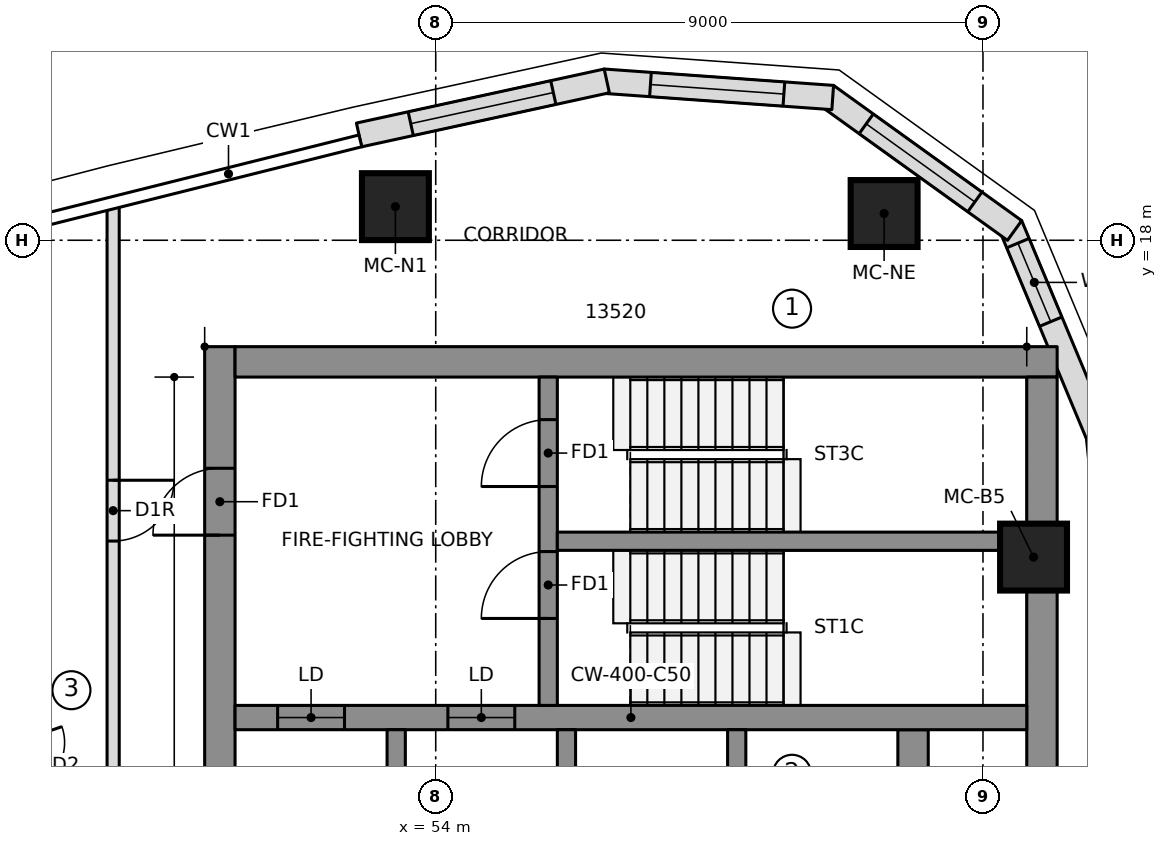
"""IFC4 building model, lengths in metres.
Left out: names, types, materials, properties, quantities, classifications, styles, units other than length and angle.
Written with IfcOpenShell. Run it as: python <this file> out.ifc"""

import sys

from ifc_helpers import new_model, si_unit, direction, frame, frame_2d, origin, origin_2d, place, context, subcontext, project, spatial, polyline, rectangle, outline, extrude, element, fill, save


model = new_model("IFC4")
c1 = context("Model", 3, precision=1e-05, world=origin(), true_north=direction((0.0, 1.0)))
c2 = subcontext(c1, "Body", "Model", "MODEL_VIEW")
j1 = project(units=[si_unit("LENGTHUNIT", "METRE"), si_unit("PLANEANGLEUNIT", "RADIAN")], contexts=[c1])
p1 = place(None, origin())
s1 = spatial("IfcSite", under=j1, at=p1, CompositionType="ELEMENT")
p2 = place(p1, origin())
s2 = spatial("IfcBuilding", under=s1, at=p2, CompositionType="ELEMENT")
p3 = place(p2, frame((0.0, 0.0, 292.75)))
s3 = spatial("IfcBuildingStorey", under=s2, at=p3, CompositionType="ELEMENT", Elevation=292.75)
p4 = place(p3, frame((50.45, 6.65, 0.0), z_axis=(0.0, 0.0, 1.0), x_axis=(0.0, 1.0, 0.0)))
e1 = element("IfcWall", 1, at=p4, inside=s3, PredefinedType="SHEAR", context=c2, shape_type="SweptSolid", body=[
    extrude(rectangle(XDim=9.6, YDim=0.5, at=frame_2d((4.8, 0.0))), origin(), (0.0, 0.0, 1.0), 3.55),
])
p5 = place(p4, frame((6.5, 0.0, 0.0)))
e2 = element("IfcOpeningElement", 2, at=p5, cuts=e1, PredefinedType="OPENING", context=c2, shape_type="SweptSolid", body=[
    extrude(rectangle(XDim=1.1, YDim=2.1, at=frame_2d((0.55, 1.05))), frame((0.0, 0.26, 0.0), z_axis=(0.0, -1.0, 0.0), x_axis=(1.0, 0.0, 0.0)), (0.0, 0.0, 1.0), 0.52),
])
p6 = place(p3, frame((50.7, 16.0, 0.0), z_axis=(0.0, 0.0, 1.0), x_axis=(1.0, 0.0, 0.0)))
e3 = element("IfcWall", 3, at=p6, inside=s3, PredefinedType="SHEAR", context=c2, shape_type="SweptSolid", body=[
    extrude(rectangle(XDim=13.52, YDim=0.5, at=frame_2d((6.76, 0.0))), origin(), (0.0, 0.0, 1.0), 3.55),
])
p7 = place(p3, frame((63.97, 6.903, 0.0), z_axis=(0.0, 0.0, 1.0), x_axis=(0.0, 1.0, 0.0)))
e4 = element("IfcWall", 4, at=p7, inside=s3, PredefinedType="SHEAR", context=c2, shape_type="SweptSolid", body=[
    extrude(rectangle(XDim=8.847, YDim=0.5, at=frame_2d((4.423, 0.0))), origin(), (0.0, 0.0, 1.0), 3.55),
])
p8 = place(p3, frame((61.85, -9.95, 0.0), z_axis=(0.0, 0.0, 1.0), x_axis=(0.0, 1.0, 0.0)))
e5 = element("IfcWall", 5, at=p8, inside=s3, PredefinedType="SHEAR", context=c2, shape_type="SweptSolid", body=[
    extrude(rectangle(XDim=19.9, YDim=0.5, at=frame_2d((9.95, 0.0))), origin(), (0.0, 0.0, 1.0), 3.55),
])
p9 = place(p3, frame((50.7, 10.15, 0.0), z_axis=(0.0, 0.0, 1.0), x_axis=(1.0, 0.0, 0.0)))
e6 = element("IfcWall", 6, at=p9, inside=s3, PredefinedType="SHEAR", context=c2, shape_type="SweptSolid", body=[
    extrude(rectangle(XDim=13.02, YDim=0.4, at=frame_2d((6.51, 0.0))), origin(), (0.0, 0.0, 1.0), 3.55),
])
p10 = place(p9, frame((0.7, 0.0, 0.0)))
e7 = element("IfcOpeningElement", 7, at=p10, cuts=e6, PredefinedType="OPENING", context=c2, shape_type="SweptSolid", body=[
    extrude(rectangle(XDim=1.1, YDim=2.1, at=frame_2d((0.55, 1.05))), frame((0.0, 0.21, 0.0), z_axis=(0.0, -1.0, 0.0), x_axis=(1.0, 0.0, 0.0)), (0.0, 0.0, 1.0), 0.42),
])
p11 = place(p9, frame((3.5, 0.0, 0.0)))
e8 = element("IfcOpeningElement", 8, at=p11, cuts=e6, PredefinedType="OPENING", context=c2, shape_type="SweptSolid", body=[
    extrude(rectangle(XDim=1.1, YDim=2.1, at=frame_2d((0.55, 1.05))), frame((0.0, 0.21, 0.0), z_axis=(0.0, -1.0, 0.0), x_axis=(1.0, 0.0, 0.0)), (0.0, 0.0, 1.0), 0.42),
])
for number, where, z_axis, x_axis in (
    (9, (53.35, 6.95, 0.0), (0.0, 0.0, 1.0), (0.0, 1.0, 0.0)),
    (10, (56.15, 6.95, 0.0), (0.0, 0.0, 1.0), (0.0, 1.0, 0.0)),
    (11, (58.95, 6.95, 0.0), (0.0, 0.0, 1.0), (0.0, 1.0, 0.0)),
):
    element("IfcWall", number, at=place(p3, frame(where, z_axis=z_axis, x_axis=x_axis)), inside=s3, PredefinedType="SHEAR", context=c2, shape_type="SweptSolid", body=[
        extrude(rectangle(XDim=3.0, YDim=0.3, at=frame_2d((1.5, 0.0))), origin(), (0.0, 0.0, 1.0), 3.55),
    ])
p12 = place(p3, frame((55.85, 10.35, 0.0), z_axis=(0.0, 0.0, 1.0), x_axis=(0.0, 1.0, 0.0)))
e12 = element("IfcWall", 12, at=p12, inside=s3, PredefinedType="SHEAR", context=c2, shape_type="SweptSolid", body=[
    extrude(rectangle(XDim=5.4, YDim=0.3, at=frame_2d((2.7, 0.0))), origin(), (0.0, 0.0, 1.0), 3.55),
])
p13 = place(p12, frame((1.43, 0.0, 0.0)))
e13 = element("IfcOpeningElement", 13, at=p13, cuts=e12, PredefinedType="OPENING", context=c2, shape_type="SweptSolid", body=[
    extrude(rectangle(XDim=1.1, YDim=2.1, at=frame_2d((0.55, 1.05))), frame((0.0, 0.16, 0.0), z_axis=(0.0, -1.0, 0.0), x_axis=(1.0, 0.0, 0.0)), (0.0, 0.0, 1.0), 0.32),
])
p14 = place(p12, frame((3.6, 0.0, 0.0)))
e14 = element("IfcOpeningElement", 14, at=p14, cuts=e12, PredefinedType="OPENING", context=c2, shape_type="SweptSolid", body=[
    extrude(rectangle(XDim=1.1, YDim=2.1, at=frame_2d((0.55, 1.05))), frame((0.0, 0.16, 0.0), z_axis=(0.0, -1.0, 0.0), x_axis=(1.0, 0.0, 0.0)), (0.0, 0.0, 1.0), 0.32),
])
p15 = place(p3, frame((56.0, 13.05, 0.0), z_axis=(0.0, 0.0, 1.0), x_axis=(1.0, 0.0, 0.0)))
e15 = element("IfcWall", 15, at=p15, inside=s3, PredefinedType="SHEAR", context=c2, shape_type="SweptSolid", body=[
    extrude(rectangle(XDim=7.72, YDim=0.3, at=frame_2d((3.86, 0.0))), origin(), (0.0, 0.0, 1.0), 3.55),
])
for number, where, z_axis, x_axis in (
    (16, (63.832, 12.789, 0.0), (0.0, 0.0, 1.0), (1.0, 0.0, 0.0)),
    (17, (61.374, 18.44, 0.0), (0.0, 0.0, 1.0), (1.0, 0.0, 0.0)),
    (18, (53.337, 18.553, 0.0), (0.0, 0.0, 1.0), (1.0, 0.0, 0.0)),
):
    element("IfcColumn", number, at=place(p3, frame(where, z_axis=z_axis, x_axis=x_axis)), inside=s3, PredefinedType="COLUMN", context=c2, shape_type="SweptSolid", body=[
        extrude(rectangle(XDim=1.1, YDim=1.1, at=origin_2d()), origin(), (0.0, 0.0, 1.0), 3.55),
    ])
p16 = place(p3, frame((65.331, 10.571, 0.0), z_axis=(0.0, 0.0, 1.0), x_axis=(-0.102249826987, 0.994758751096, 0.0)))
e19 = element("IfcWall", 19, at=p16, inside=s3, PredefinedType="NOTDEFINED", context=c2, shape_type="SweptSolid", body=[
    extrude(outline(polyline([(-0.003, -0.2), (4.263, -0.2), (4.204, 0.2), (0.003, 0.2), (-0.003, -0.2)])), origin(), (0.0, 0.0, 1.0), 3.25),
])
p17 = place(p16, frame((0.417, 0.0, 0.5)))
e20 = element("IfcOpeningElement", 20, at=p17, cuts=e19, PredefinedType="OPENING", context=c2, shape_type="SweptSolid", body=[
    extrude(rectangle(XDim=2.4, YDim=2.0, at=frame_2d((1.2, 1.0))), frame((0.0, 0.21, 0.0), z_axis=(0.0, -1.0, 0.0), x_axis=(1.0, 0.0, 0.0)), (0.0, 0.0, 1.0), 0.42),
])
p18 = place(p3, frame((64.898, 14.782, 0.0), z_axis=(0.0, 0.0, 1.0), x_axis=(-0.385285857918, 0.922797273343, 0.0)))
e21 = element("IfcWall", 21, at=p18, inside=s3, PredefinedType="NOTDEFINED", context=c2, shape_type="SweptSolid", body=[
    extrude(outline(polyline([(-0.03, -0.2), (3.753, -0.2), (3.64, 0.2), (0.03, 0.2), (-0.03, -0.2)])), origin(), (0.0, 0.0, 1.0), 3.25),
])
p19 = place(p18, frame((2.035, 0.0, 0.6)))
e22 = element("IfcOpeningElement", 22, at=p19, cuts=e21, PredefinedType="OPENING", context=c2, shape_type="SweptSolid", body=[
    extrude(outline(polyline([(0.0, 1.75), (0.053, 2.018), (0.205, 2.245), (0.432, 2.397), (0.7, 2.45), (0.968, 2.397), (1.195, 2.245), (1.347, 2.018), (1.4, 1.75), (1.4, 0.7), (1.347, 0.432), (1.195, 0.205), (0.968, 0.053), (0.7, 0.0), (0.432, 0.053), (0.205, 0.205), (0.053, 0.432), (0.0, 0.7), (0.0, 1.75)])), frame((0.0, 0.21, 0.0), z_axis=(0.0, -1.0, 0.0), x_axis=(1.0, 0.0, 0.0)), (0.0, 0.0, 1.0), 0.42),
])
p20 = place(p3, frame((63.474, 18.194, 0.0), z_axis=(0.0, 0.0, 1.0), x_axis=(-0.811962548682, 0.583709533533, 0.0)))
e23 = element("IfcWall", 23, at=p20, inside=s3, PredefinedType="NOTDEFINED", context=c2, shape_type="SweptSolid", body=[
    extrude(outline(polyline([(-0.057, -0.2), (3.753, -0.2), (3.64, 0.2), (0.057, 0.2), (-0.057, -0.2)])), origin(), (0.0, 0.0, 1.0), 3.25),
])
p21 = place(p20, frame((0.748, 0.0, 0.6)))
e24 = element("IfcOpeningElement", 24, at=p21, cuts=e23, PredefinedType="OPENING", context=c2, shape_type="SweptSolid", body=[
    extrude(outline(polyline([(0.0, 1.35), (0.084, 1.771), (0.322, 2.128), (0.679, 2.366), (1.1, 2.45), (1.521, 2.366), (1.878, 2.128), (2.116, 1.771), (2.2, 1.35), (2.2, 1.1), (2.116, 0.679), (1.878, 0.322), (1.521, 0.084), (1.1, 0.0), (0.679, 0.084), (0.322, 0.322), (0.084, 0.679), (0.0, 1.1), (0.0, 1.35)])), frame((0.0, 0.21, 0.0), z_axis=(0.0, -1.0, 0.0), x_axis=(1.0, 0.0, 0.0)), (0.0, 0.0, 1.0), 0.42),
])
p22 = place(p3, frame((60.472, 20.352, 0.0), z_axis=(0.0, 0.0, 1.0), x_axis=(-0.99746272096, 0.071190731806, 0.0)))
e25 = element("IfcWall", 25, at=p22, inside=s3, PredefinedType="NOTDEFINED", context=c2, shape_type="SweptSolid", body=[
    extrude(outline(polyline([(-0.057, -0.2), (3.726, -0.2), (3.668, 0.2), (0.057, 0.2), (-0.057, -0.2)])), origin(), (0.0, 0.0, 1.0), 3.25),
])
p23 = place(p22, frame((0.748, 0.0, 0.6)))
e26 = element("IfcOpeningElement", 26, at=p23, cuts=e25, PredefinedType="OPENING", context=c2, shape_type="SweptSolid", body=[
    extrude(outline(polyline([(0.0, 1.35), (0.084, 1.771), (0.322, 2.128), (0.679, 2.366), (1.1, 2.45), (1.521, 2.366), (1.878, 2.128), (2.116, 1.771), (2.2, 1.35), (2.2, 1.1), (2.116, 0.679), (1.878, 0.322), (1.521, 0.084), (1.1, 0.0), (0.679, 0.084), (0.322, 0.322), (0.084, 0.679), (0.0, 1.1), (0.0, 1.35)])), frame((0.0, 0.21, 0.0), z_axis=(0.0, -1.0, 0.0), x_axis=(1.0, 0.0, 0.0)), (0.0, 0.0, 1.0), 0.42),
])
p24 = place(p3, frame((56.785, 20.615, 0.0), z_axis=(0.0, 0.0, 1.0), x_axis=(-0.977020225348, -0.213146614471, 0.0)))
e27 = element("IfcWall", 27, at=p24, inside=s3, PredefinedType="NOTDEFINED", context=c2, shape_type="SweptSolid", body=[
    extrude(outline(polyline([(-0.029, -0.2), (4.142, -0.2), (4.142, 0.2), (0.029, 0.2), (-0.029, -0.2)])), origin(), (0.0, 0.0, 1.0), 3.25),
])
p25 = place(p24, frame((0.871, 0.0, 0.5)))
e28 = element("IfcOpeningElement", 28, at=p25, cuts=e27, PredefinedType="OPENING", context=c2, shape_type="SweptSolid", body=[
    extrude(rectangle(XDim=2.4, YDim=2.0, at=frame_2d((1.2, 1.0))), frame((0.0, 0.21, 0.0), z_axis=(0.0, -1.0, 0.0), x_axis=(1.0, 0.0, 0.0)), (0.0, 0.0, 1.0), 0.42),
])
p26 = place(p3, frame((48.695, 18.553, 0.0), z_axis=(0.0, 0.0, 1.0), x_axis=(0.0, -1.0, 0.0)))
e29 = element("IfcWall", 29, at=p26, inside=s3, PredefinedType="PARTITIONING", context=c2, shape_type="SweptSolid", body=[
    extrude(rectangle(XDim=9.997, YDim=0.2, at=frame_2d((4.998, 0.0))), origin(), (0.0, 0.0, 1.0), 3.25),
])
p27 = place(p26, frame((4.5, 0.0, 0.0)))
e30 = element("IfcOpeningElement", 30, at=p27, cuts=e29, PredefinedType="OPENING", context=c2, shape_type="SweptSolid", body=[
    extrude(rectangle(XDim=1.0, YDim=2.1, at=frame_2d((0.5, 1.05))), frame((0.0, 0.11, 0.0), z_axis=(0.0, -1.0, 0.0), x_axis=(1.0, 0.0, 0.0)), (0.0, 0.0, 1.0), 0.22),
])
p28 = place(p19, origin())
e31 = element("IfcWindow", 31, at=p28, inside=s3, PartitioningType="SINGLE_PANEL", PredefinedType="WINDOW", context=c2, shape_type="SweptSolid", body=[
    extrude(outline(polyline([(0.0, 1.75), (0.053, 2.018), (0.205, 2.245), (0.432, 2.397), (0.7, 2.45), (0.968, 2.397), (1.195, 2.245), (1.347, 2.018), (1.4, 1.75), (1.4, 0.7), (1.347, 0.432), (1.195, 0.205), (0.968, 0.053), (0.7, 0.0), (0.432, 0.053), (0.205, 0.205), (0.053, 0.432), (0.0, 0.7), (0.0, 1.75)])), frame((0.0, 0.17, 0.0), z_axis=(0.0, -1.0, 0.0), x_axis=(1.0, 0.0, 0.0)), (0.0, 0.0, 1.0), 0.06),
])
fill(e22, e31)
p29 = place(p21, origin())
e32 = element("IfcWindow", 32, at=p29, inside=s3, PartitioningType="SINGLE_PANEL", PredefinedType="WINDOW", context=c2, shape_type="SweptSolid", body=[
    extrude(outline(polyline([(0.0, 1.35), (0.084, 1.771), (0.322, 2.128), (0.679, 2.366), (1.1, 2.45), (1.521, 2.366), (1.878, 2.128), (2.116, 1.771), (2.2, 1.35), (2.2, 1.1), (2.116, 0.679), (1.878, 0.322), (1.521, 0.084), (1.1, 0.0), (0.679, 0.084), (0.322, 0.322), (0.084, 0.679), (0.0, 1.1), (0.0, 1.35)])), frame((0.0, 0.17, 0.0), z_axis=(0.0, -1.0, 0.0), x_axis=(1.0, 0.0, 0.0)), (0.0, 0.0, 1.0), 0.06),
])
fill(e24, e32)
p30 = place(p23, origin())
e33 = element("IfcWindow", 33, at=p30, inside=s3, PartitioningType="SINGLE_PANEL", PredefinedType="WINDOW", context=c2, shape_type="SweptSolid", body=[
    extrude(outline(polyline([(0.0, 1.35), (0.084, 1.771), (0.322, 2.128), (0.679, 2.366), (1.1, 2.45), (1.521, 2.366), (1.878, 2.128), (2.116, 1.771), (2.2, 1.35), (2.2, 1.1), (2.116, 0.679), (1.878, 0.322), (1.521, 0.084), (1.1, 0.0), (0.679, 0.084), (0.322, 0.322), (0.084, 0.679), (0.0, 1.1), (0.0, 1.35)])), frame((0.0, 0.17, 0.0), z_axis=(0.0, -1.0, 0.0), x_axis=(1.0, 0.0, 0.0)), (0.0, 0.0, 1.0), 0.06),
])
fill(e26, e33)
p31 = place(p25, origin())
e34 = element("IfcWindow", 34, at=p31, inside=s3, PartitioningType="SINGLE_PANEL", PredefinedType="WINDOW", context=c2, shape_type="SweptSolid", body=[
    extrude(rectangle(XDim=2.4, YDim=2.0, at=frame_2d((1.2, 1.0))), frame((0.0, 0.17, 0.0), z_axis=(0.0, -1.0, 0.0), x_axis=(1.0, 0.0, 0.0)), (0.0, 0.0, 1.0), 0.06),
])
fill(e28, e34)
p32 = place(p27, origin())
e35 = element("IfcDoor", 35, at=p32, inside=s3, OperationType="SINGLE_SWING_RIGHT", PredefinedType="DOOR", context=c2, shape_type="SweptSolid", body=[
    extrude(rectangle(XDim=1.0, YDim=2.1, at=frame_2d((0.5, 1.05))), frame((0.0, 0.025, 0.0), z_axis=(0.0, -1.0, 0.0), x_axis=(1.0, 0.0, 0.0)), (0.0, 0.0, 1.0), 0.05),
])
fill(e30, e35)
p33 = place(p10, origin())
e36 = element("IfcDoor", 36, at=p33, inside=s3, OperationType="DOUBLE_DOOR_SLIDING", PredefinedType="DOOR", context=c2, shape_type="SweptSolid", body=[
    extrude(rectangle(XDim=1.1, YDim=2.1, at=frame_2d((0.55, 1.05))), frame((0.0, 0.025, 0.0), z_axis=(0.0, -1.0, 0.0), x_axis=(1.0, 0.0, 0.0)), (0.0, 0.0, 1.0), 0.05),
])
fill(e7, e36)
p34 = place(p11, origin())
e37 = element("IfcDoor", 37, at=p34, inside=s3, OperationType="DOUBLE_DOOR_SLIDING", PredefinedType="DOOR", context=c2, shape_type="SweptSolid", body=[
    extrude(rectangle(XDim=1.1, YDim=2.1, at=frame_2d((0.55, 1.05))), frame((0.0, 0.025, 0.0), z_axis=(0.0, -1.0, 0.0), x_axis=(1.0, 0.0, 0.0)), (0.0, 0.0, 1.0), 0.05),
])
fill(e8, e37)
p35 = place(p13, origin())
e38 = element("IfcDoor", 38, at=p35, inside=s3, OperationType="SINGLE_SWING_RIGHT", PredefinedType="DOOR", context=c2, shape_type="SweptSolid", body=[
    extrude(rectangle(XDim=1.1, YDim=2.1, at=frame_2d((0.55, 1.05))), frame((0.0, 0.025, 0.0), z_axis=(0.0, -1.0, 0.0), x_axis=(1.0, 0.0, 0.0)), (0.0, 0.0, 1.0), 0.05),
])
fill(e13, e38)
p36 = place(p14, origin())
e39 = element("IfcDoor", 39, at=p36, inside=s3, OperationType="SINGLE_SWING_RIGHT", PredefinedType="DOOR", context=c2, shape_type="SweptSolid", body=[
    extrude(rectangle(XDim=1.1, YDim=2.1, at=frame_2d((0.55, 1.05))), frame((0.0, 0.025, 0.0), z_axis=(0.0, -1.0, 0.0), x_axis=(1.0, 0.0, 0.0)), (0.0, 0.0, 1.0), 0.05),
])
fill(e14, e39)
p37 = place(p5, origin())
e40 = element("IfcDoor", 40, at=p37, inside=s3, OperationType="SINGLE_SWING_RIGHT", PredefinedType="DOOR", context=c2, shape_type="SweptSolid", body=[
    extrude(rectangle(XDim=1.1, YDim=2.1, at=frame_2d((0.55, 1.05))), frame((0.0, 0.025, 0.0), z_axis=(0.0, -1.0, 0.0), x_axis=(1.0, 0.0, 0.0)), (0.0, 0.0, 1.0), 0.05),
])
fill(e2, e40)
save(model, sys.argv[1])
